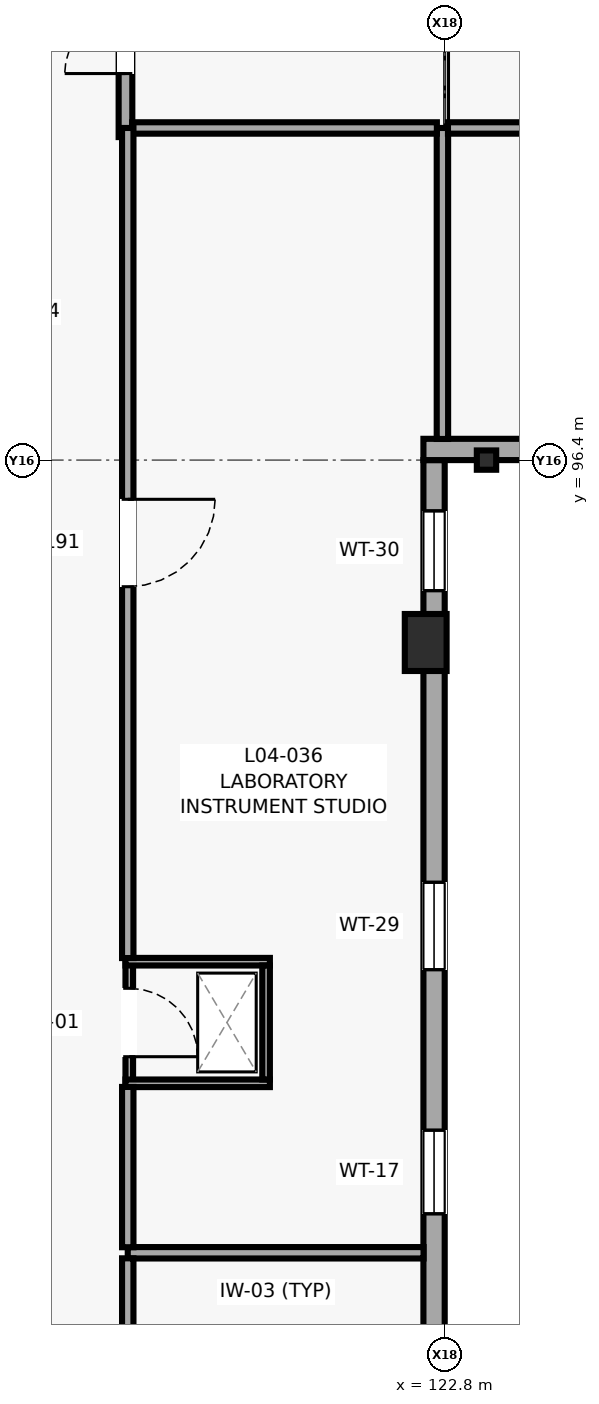
"""IFC4 building model, lengths in metres.
Left out: names, types, materials, properties, quantities, classifications, styles, units other than length and angle.
Written with IfcOpenShell. Run it as: python <this file> out.ifc"""

import sys

from ifc_helpers import new_model, si_unit, direction, frame, frame_2d, origin, origin_2d, place, context, subcontext, project, spatial, rectangle, i_section, extrude, element, fill, save


model = new_model("IFC4")
c1 = context("Model", 3, precision=1e-05, world=origin(), true_north=direction((0.0, 1.0)))
c2 = subcontext(c1, "Body", "Model", "MODEL_VIEW")
j1 = project(units=[si_unit("LENGTHUNIT", "METRE"), si_unit("PLANEANGLEUNIT", "RADIAN")], contexts=[c1])
p1 = place(None, origin())
s1 = spatial("IfcSite", under=j1, at=p1, CompositionType="ELEMENT")
p2 = place(p1, origin())
s2 = spatial("IfcBuilding", under=s1, at=p2, CompositionType="ELEMENT")
p3 = place(p2, frame((0.0, 0.0, 16.2)))
s3 = spatial("IfcBuildingStorey", under=s2, at=p3, CompositionType="ELEMENT", Elevation=16.2)
p4 = place(p3, frame((122.55, 94.0, 0.0), z_axis=(0.0, 0.0, 1.0), x_axis=(1.0, 0.0, 0.0)))
e1 = element("IfcColumn", 1, at=p4, inside=s3, PredefinedType="COLUMN", context=c2, shape_type="SweptSolid", body=[
    extrude(rectangle(XDim=0.55, YDim=0.75, at=origin_2d()), origin(), (0.0, 0.0, 1.0), 4.0),
])
p5 = place(p3, frame((123.35, 96.4, 0.0), z_axis=(0.0, 0.0, 1.0), x_axis=(1.0, 0.0, 0.0)))
e2 = element("IfcColumn", 2, at=p5, inside=s3, PredefinedType="COLUMN", context=c2, shape_type="SweptSolid", body=[
    extrude(i_section(OverallWidth=0.255, OverallDepth=0.254, WebThickness=0.009, FlangeThickness=0.014, FilletRadius=0.013, at=origin_2d()), origin(), (0.0, 0.0, 1.0), 4.0),
])
p6 = place(p3, frame((122.66, 84.14, 0.0), z_axis=(0.0, 0.0, 1.0), x_axis=(0.0, 1.0, 0.0)))
e3 = element("IfcWall", 3, at=p6, inside=s3, PredefinedType="SOLIDWALL", context=c2, shape_type="SweptSolid", body=[
    extrude(rectangle(XDim=12.26, YDim=0.28, at=frame_2d((6.13, 0.0))), origin(), (0.0, 0.0, 1.0), 3.225),
])
p7 = place(p6, frame((2.343, 0.0, 0.75)))
e4 = element("IfcOpeningElement", 4, at=p7, cuts=e3, PredefinedType="OPENING", context=c2, shape_type="SweptSolid", body=[
    extrude(rectangle(XDim=1.1, YDim=2.1, at=frame_2d((0.55, 1.05))), frame((0.0, 0.15, 0.0), z_axis=(0.0, -1.0, 0.0), x_axis=(1.0, 0.0, 0.0)), (0.0, 0.0, 1.0), 0.3),
])
p8 = place(p6, frame((5.555, 0.0, 1.05)))
e5 = element("IfcOpeningElement", 5, at=p8, cuts=e3, PredefinedType="OPENING", context=c2, shape_type="SweptSolid", body=[
    extrude(rectangle(XDim=1.15, YDim=1.4, at=frame_2d((0.575, 0.7))), frame((0.0, 0.15, 0.0), z_axis=(0.0, -1.0, 0.0), x_axis=(1.0, 0.0, 0.0)), (0.0, 0.0, 1.0), 0.3),
])
p9 = place(p6, frame((10.542, 0.0, 1.05)))
e6 = element("IfcOpeningElement", 6, at=p9, cuts=e3, PredefinedType="OPENING", context=c2, shape_type="SweptSolid", body=[
    extrude(rectangle(XDim=1.05, YDim=1.3, at=frame_2d((0.525, 0.65))), frame((0.0, 0.15, 0.0), z_axis=(0.0, -1.0, 0.0), x_axis=(1.0, 0.0, 0.0)), (0.0, 0.0, 1.0), 0.3),
])
p10 = place(p3, frame((122.52, 96.54, 0.0), z_axis=(0.0, 0.0, 1.0), x_axis=(1.0, 0.0, 0.0)))
e7 = element("IfcWall", 7, at=p10, inside=s3, PredefinedType="SOLIDWALL", context=c2, shape_type="SweptSolid", body=[
    extrude(rectangle(XDim=18.497, YDim=0.28, at=frame_2d((9.249, 0.0))), origin(), (0.0, 0.0, 1.0), 3.025),
])
p11 = place(p10, frame((1.5, 0.0, 1.05)))
e8 = element("IfcOpeningElement", 8, at=p11, cuts=e7, PredefinedType="OPENING", context=c2, shape_type="SweptSolid", body=[
    extrude(rectangle(XDim=1.6, YDim=1.35, at=frame_2d((0.8, 0.675))), frame((0.0, 0.15, 0.0), z_axis=(0.0, -1.0, 0.0), x_axis=(1.0, 0.0, 0.0)), (0.0, 0.0, 1.0), 0.3),
])
p12 = place(p10, frame((4.449, 0.0, 1.05)))
e9 = element("IfcOpeningElement", 9, at=p12, cuts=e7, PredefinedType="OPENING", context=c2, shape_type="SweptSolid", body=[
    extrude(rectangle(XDim=2.2, YDim=1.35, at=frame_2d((1.1, 0.675))), frame((0.0, 0.15, 0.0), z_axis=(0.0, -1.0, 0.0), x_axis=(1.0, 0.0, 0.0)), (0.0, 0.0, 1.0), 0.3),
])
p13 = place(p10, frame((8.649, 0.0, 1.05)))
e10 = element("IfcOpeningElement", 10, at=p13, cuts=e7, PredefinedType="OPENING", context=c2, shape_type="SweptSolid", body=[
    extrude(rectangle(XDim=1.2, YDim=0.9, at=frame_2d((0.6, 0.45))), frame((0.0, 0.15, 0.0), z_axis=(0.0, -1.0, 0.0), x_axis=(1.0, 0.0, 0.0)), (0.0, 0.0, 1.0), 0.3),
])
p14 = place(p10, frame((12.498, 0.0, 1.05)))
e11 = element("IfcOpeningElement", 11, at=p14, cuts=e7, PredefinedType="OPENING", context=c2, shape_type="SweptSolid", body=[
    extrude(rectangle(XDim=0.9, YDim=0.9, at=frame_2d((0.45, 0.45))), frame((0.0, 0.15, 0.0), z_axis=(0.0, -1.0, 0.0), x_axis=(1.0, 0.0, 0.0)), (0.0, 0.0, 1.0), 0.3),
])
p15 = place(p10, frame((15.972, 0.0, 1.05)))
e12 = element("IfcOpeningElement", 12, at=p15, cuts=e7, PredefinedType="OPENING", context=c2, shape_type="SweptSolid", body=[
    extrude(rectangle(XDim=1.35, YDim=1.2, at=frame_2d((0.675, 0.6))), frame((0.0, 0.15, 0.0), z_axis=(0.0, -1.0, 0.0), x_axis=(1.0, 0.0, 0.0)), (0.0, 0.0, 1.0), 0.3),
])
p16 = place(p3, frame((118.6, 100.65, 0.0), z_axis=(0.0, 0.0, 1.0), x_axis=(0.0, 1.0, 0.0)))
e13 = element("IfcWall", 13, at=p16, inside=s3, PredefinedType="PARTITIONING", context=c2, shape_type="SweptSolid", body=[
    extrude(rectangle(XDim=3.272, YDim=0.18, at=frame_2d((1.636, 0.0))), origin(), (0.0, 0.0, 1.0), 3.78),
])
p17 = place(p16, frame((0.836, 0.0, 0.0)))
e14 = element("IfcOpeningElement", 14, at=p17, cuts=e13, PredefinedType="OPENING", context=c2, shape_type="SweptSolid", body=[
    extrude(rectangle(XDim=1.6, YDim=2.25, at=frame_2d((0.8, 1.125))), frame((0.0, 0.1, 0.0), z_axis=(0.0, -1.0, 0.0), x_axis=(1.0, 0.0, 0.0)), (0.0, 0.0, 1.0), 0.2),
])
p18 = place(p3, frame((118.65, 88.2, 0.0), z_axis=(0.0, 0.0, 1.0), x_axis=(0.0, 1.0, 0.0)))
e15 = element("IfcWall", 15, at=p18, inside=s3, PredefinedType="PARTITIONING", context=c2, shape_type="SweptSolid", body=[
    extrude(rectangle(XDim=1.6, YDim=0.1, at=frame_2d((0.8, 0.0))), origin(), (0.0, 0.0, 1.0), 3.225),
])
p19 = place(p18, frame((0.35, 0.0, 0.0)))
e16 = element("IfcOpeningElement", 16, at=p19, cuts=e15, PredefinedType="OPENING", context=c2, shape_type="SweptSolid", body=[
    extrude(rectangle(XDim=0.9, YDim=2.05, at=frame_2d((0.45, 1.025))), frame((0.0, 0.06, 0.0), z_axis=(0.0, -1.0, 0.0), x_axis=(1.0, 0.0, 0.0)), (0.0, 0.0, 1.0), 0.12),
])
for number, where, z_axis, x_axis in (
    (17, (118.6, 88.2, 0.0), (0.0, 0.0, 1.0), (1.0, 0.0, 0.0)),
    (18, (118.6, 89.8, 0.0), (0.0, 0.0, 1.0), (1.0, 0.0, 0.0)),
):
    element("IfcWall", number, at=place(p3, frame(where, z_axis=z_axis, x_axis=x_axis)), inside=s3, PredefinedType="PARTITIONING", context=c2, shape_type="SweptSolid", body=[
        extrude(rectangle(XDim=1.9, YDim=0.1, at=frame_2d((0.95, 0.0))), origin(), (0.0, 0.0, 1.0), 3.78),
    ])
p20 = place(p3, frame((120.45, 88.25, 0.0), z_axis=(0.0, 0.0, 1.0), x_axis=(0.0, 1.0, 0.0)))
e19 = element("IfcWall", 19, at=p20, inside=s3, PredefinedType="PARTITIONING", context=c2, shape_type="SweptSolid", body=[
    extrude(rectangle(XDim=1.5, YDim=0.1, at=frame_2d((0.75, 0.0))), origin(), (0.0, 0.0, 1.0), 3.78),
])
p21 = place(p3, frame((122.522, 85.97, 0.0), z_axis=(0.0, 0.0, 1.0), x_axis=(-1.0, 0.0, 0.0)))
e20 = element("IfcWall", 20, at=p21, inside=s3, PredefinedType="PARTITIONING", context=c2, shape_type="SweptSolid", body=[
    extrude(rectangle(XDim=3.892, YDim=0.15, at=frame_2d((1.946, 0.0))), origin(), (0.0, 0.0, 1.0), 3.775),
])
p22 = place(p3, frame((118.63, 85.897, 0.0), z_axis=(0.0, 0.0, 1.0), x_axis=(0.0, -1.0, 0.0)))
e21 = element("IfcWall", 21, at=p22, inside=s3, PredefinedType="PARTITIONING", context=c2, shape_type="SweptSolid", body=[
    extrude(rectangle(XDim=14.019, YDim=0.15, at=frame_2d((7.01, 0.0))), origin(), (0.0, 0.0, 1.0), 3.225),
])
p23 = place(p22, frame((6.535, 0.0, 0.0)))
e22 = element("IfcOpeningElement", 22, at=p23, cuts=e21, PredefinedType="OPENING", context=c2, shape_type="SweptSolid", body=[
    extrude(rectangle(XDim=0.95, YDim=2.1, at=frame_2d((0.475, 1.05))), frame((0.0, 0.085, 0.0), z_axis=(0.0, -1.0, 0.0), x_axis=(1.0, 0.0, 0.0)), (0.0, 0.0, 1.0), 0.17),
])
p24 = place(p3, frame((122.77, 96.678, 0.0), z_axis=(0.0, 0.0, 1.0), x_axis=(0.0, 1.0, 0.0)))
e23 = element("IfcWall", 23, at=p24, inside=s3, PredefinedType="PARTITIONING", context=c2, shape_type="SweptSolid", body=[
    extrude(rectangle(XDim=4.092, YDim=0.15, at=frame_2d((2.046, 0.0))), origin(), (0.0, 0.0, 1.0), 3.775),
])
p25 = place(p3, frame((122.697, 100.77, 0.0), z_axis=(0.0, 0.0, 1.0), x_axis=(-1.0, 0.0, 0.0)))
e24 = element("IfcWall", 24, at=p25, inside=s3, PredefinedType="PARTITIONING", context=c2, shape_type="SweptSolid", body=[
    extrude(rectangle(XDim=4.009, YDim=0.15, at=frame_2d((2.004, 0.0))), origin(), (0.0, 0.0, 1.0), 3.775),
])
p26 = place(p3, frame((118.63, 100.77, 0.0), z_axis=(0.0, 0.0, 1.0), x_axis=(0.0, -1.0, 0.0)))
e25 = element("IfcWall", 25, at=p26, inside=s3, PredefinedType="PARTITIONING", context=c2, shape_type="SweptSolid", body=[
    extrude(rectangle(XDim=10.922, YDim=0.15, at=frame_2d((5.461, 0.0))), origin(), (0.0, 0.0, 1.0), 3.225),
])
p27 = place(p26, frame((4.886, 0.0, 0.0)))
e26 = element("IfcOpeningElement", 26, at=p27, cuts=e25, PredefinedType="OPENING", context=c2, shape_type="SweptSolid", body=[
    extrude(rectangle(XDim=1.15, YDim=2.2, at=frame_2d((0.575, 1.1))), frame((0.0, 0.085, 0.0), z_axis=(0.0, -1.0, 0.0), x_axis=(1.0, 0.0, 0.0)), (0.0, 0.0, 1.0), 0.17),
])
p28 = place(p3, frame((118.63, 88.152, 0.0), z_axis=(0.0, 0.0, 1.0), x_axis=(0.0, -1.0, 0.0)))
e27 = element("IfcWall", 27, at=p28, inside=s3, PredefinedType="PARTITIONING", context=c2, shape_type="SweptSolid", body=[
    extrude(rectangle(XDim=2.109, YDim=0.15, at=frame_2d((1.055, 0.0))), origin(), (0.0, 0.0, 1.0), 3.225),
])
p29 = place(p3, frame((144.122, 100.77, 0.0), z_axis=(0.0, 0.0, 1.0), x_axis=(-1.0, 0.0, 0.0)))
e28 = element("IfcWall", 28, at=p29, inside=s3, PredefinedType="PARTITIONING", context=c2, shape_type="SweptSolid", body=[
    extrude(rectangle(XDim=21.279, YDim=0.15, at=frame_2d((10.64, 0.0))), origin(), (0.0, 0.0, 1.0), 3.76),
])
p30 = place(p29, frame((10.065, 0.0, 0.0)))
e29 = element("IfcOpeningElement", 29, at=p30, cuts=e28, PredefinedType="OPENING", context=c2, shape_type="SweptSolid", body=[
    extrude(rectangle(XDim=1.15, YDim=2.2, at=frame_2d((0.575, 1.1))), frame((0.0, 0.085, 0.0), z_axis=(0.0, -1.0, 0.0), x_axis=(1.0, 0.0, 0.0)), (0.0, 0.0, 1.0), 0.17),
])
p31 = place(p7, origin())
e30 = element("IfcWindow", 30, at=p31, inside=s3, PartitioningType="SINGLE_PANEL", PredefinedType="WINDOW", context=c2, shape_type="SweptSolid", body=[
    extrude(rectangle(XDim=1.1, YDim=2.1, at=frame_2d((0.55, 1.05))), frame((0.0, 0.03, 0.0), z_axis=(0.0, -1.0, 0.0), x_axis=(1.0, 0.0, 0.0)), (0.0, 0.0, 1.0), 0.06),
])
fill(e4, e30)
p32 = place(p8, origin())
e31 = element("IfcWindow", 31, at=p32, inside=s3, PartitioningType="SINGLE_PANEL", PredefinedType="WINDOW", context=c2, shape_type="SweptSolid", body=[
    extrude(rectangle(XDim=1.15, YDim=1.4, at=frame_2d((0.575, 0.7))), frame((0.0, 0.03, 0.0), z_axis=(0.0, -1.0, 0.0), x_axis=(1.0, 0.0, 0.0)), (0.0, 0.0, 1.0), 0.06),
])
fill(e5, e31)
p33 = place(p9, origin())
e32 = element("IfcWindow", 32, at=p33, inside=s3, PartitioningType="SINGLE_PANEL", PredefinedType="WINDOW", context=c2, shape_type="SweptSolid", body=[
    extrude(rectangle(XDim=1.05, YDim=1.3, at=frame_2d((0.525, 0.65))), frame((0.0, 0.03, 0.0), z_axis=(0.0, -1.0, 0.0), x_axis=(1.0, 0.0, 0.0)), (0.0, 0.0, 1.0), 0.06),
])
fill(e6, e32)
p34 = place(p17, origin())
e33 = element("IfcDoor", 33, at=p34, inside=s3, OperationType="DOUBLE_DOOR_SINGLE_SWING", PredefinedType="DOOR", context=c2, shape_type="SweptSolid", body=[
    extrude(rectangle(XDim=1.6, YDim=2.25, at=frame_2d((0.8, 1.125))), frame((0.0, 0.025, 0.0), z_axis=(0.0, -1.0, 0.0), x_axis=(1.0, 0.0, 0.0)), (0.0, 0.0, 1.0), 0.05),
])
fill(e14, e33)
p35 = place(p19, frame((0.9, 0.0, 0.0), z_axis=(0.0, 0.0, 1.0), x_axis=(-1.0, 0.0, 0.0)))
e34 = element("IfcDoor", 34, at=p35, inside=s3, OperationType="SINGLE_SWING_LEFT", PredefinedType="USERDEFINED", context=c2, shape_type="SweptSolid", body=[
    extrude(rectangle(XDim=0.9, YDim=2.05, at=frame_2d((0.45, 1.025))), frame((0.0, 0.025, 0.0), z_axis=(0.0, -1.0, 0.0), x_axis=(1.0, 0.0, 0.0)), (0.0, 0.0, 1.0), 0.05),
])
fill(e16, e34)
p36 = place(p27, origin())
e35 = element("IfcDoor", 35, at=p36, inside=s3, OperationType="SINGLE_SWING_LEFT", PredefinedType="DOOR", context=c2, shape_type="SweptSolid", body=[
    extrude(rectangle(XDim=1.15, YDim=2.2, at=frame_2d((0.575, 1.1))), frame((0.0, 0.025, 0.0), z_axis=(0.0, -1.0, 0.0), x_axis=(1.0, 0.0, 0.0)), (0.0, 0.0, 1.0), 0.05),
])
fill(e26, e35)
save(model, sys.argv[1])
